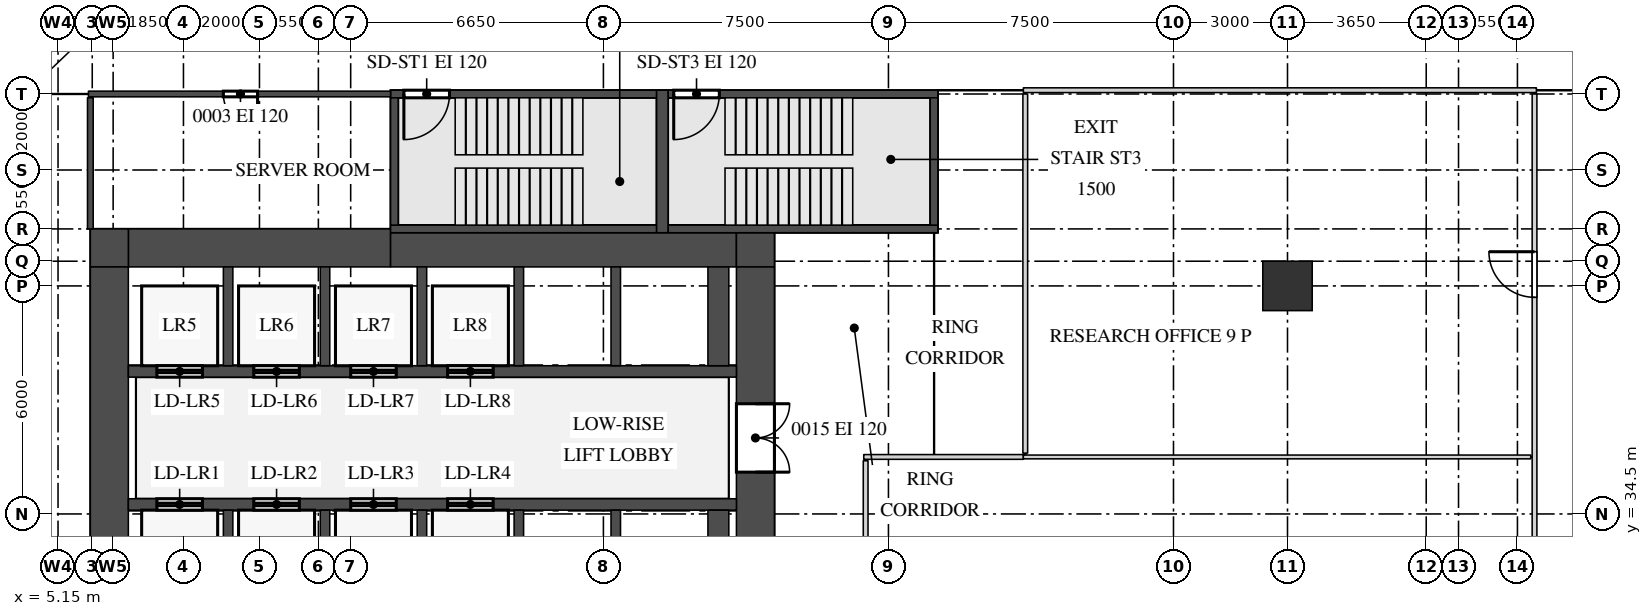
"""IFC4 building model, lengths in metres.
Left out: names, types, materials, properties, quantities, classifications, styles, units other than length and angle.
Written with IfcOpenShell. Run it as: python <this file> out.ifc"""

import sys

from ifc_helpers import new_model, si_unit, direction, frame, frame_2d, origin, origin_2d, place, context, subcontext, project, spatial, rectangle, extrude, source, transform, mapped, element, fill, save


model = new_model("IFC4")
c1 = context("Model", 3, precision=1e-05, world=origin(), true_north=direction((0.0, 1.0)))
c2 = subcontext(c1, "Body", "Model", "MODEL_VIEW")
j1 = project(units=[si_unit("LENGTHUNIT", "METRE"), si_unit("PLANEANGLEUNIT", "RADIAN")], contexts=[c1])
p1 = place(None, origin())
s1 = spatial("IfcSite", under=j1, at=p1, CompositionType="ELEMENT")
p2 = place(p1, origin())
s2 = spatial("IfcBuilding", under=s1, at=p2, CompositionType="ELEMENT")
p3 = place(p2, frame((0.0, 0.0, 127.9)))
s3 = spatial("IfcBuildingStorey", under=s2, at=p3, CompositionType="ELEMENT", Elevation=127.9)
m1 = source(origin(), c2, "Body", "SweptSolid", [
    extrude(rectangle(XDim=6.9, YDim=1.0, at=frame_2d((3.45, 0.0))), origin(), (0.0, 0.0, 1.0), 4.1),
])
p4 = place(p3, frame((7.0, 41.5, 0.0), z_axis=(0.0, 0.0, 1.0), x_axis=(1.0, 0.0, 0.0)))
e1 = element("IfcWall", 1, at=p4, inside=s3, PredefinedType="SHEAR", context=c2, shape_type="MappedRepresentation", body=[
    mapped(m1, transform((0.0, 0.0, 0.0))),
])
m2 = source(origin(), c2, "Body", "SweptSolid", [
    extrude(rectangle(XDim=9.1, YDim=0.9, at=frame_2d((4.55, 0.0))), origin(), (0.0, 0.0, 1.0), 4.1),
])
p5 = place(p3, frame((13.9, 41.45, 0.0), z_axis=(0.0, 0.0, 1.0), x_axis=(1.0, 0.0, 0.0)))
e2 = element("IfcWall", 2, at=p5, inside=s3, PredefinedType="SHEAR", context=c2, shape_type="MappedRepresentation", body=[
    mapped(m2, transform((0.0, 0.0, 0.0))),
])
m3 = source(origin(), c2, "Body", "SweptSolid", [
    extrude(rectangle(XDim=1.0, YDim=0.9, at=frame_2d((0.5, 0.0))), origin(), (0.0, 0.0, 1.0), 4.1),
])
p6 = place(p3, frame((23.0, 41.45, 0.0), z_axis=(0.0, 0.0, 1.0), x_axis=(1.0, 0.0, 0.0)))
e3 = element("IfcWall", 3, at=p6, inside=s3, PredefinedType="SHEAR", context=c2, shape_type="MappedRepresentation", body=[
    mapped(m3, transform((0.0, 0.0, 0.0))),
])
m4 = source(origin(), c2, "Body", "SweptSolid", [
    extrude(rectangle(XDim=1.0, YDim=1.0, at=frame_2d((0.5, 0.0))), origin(), (0.0, 0.0, 1.0), 4.1),
])
p7 = place(p3, frame((6.0, 41.5, 0.0), z_axis=(0.0, 0.0, 1.0), x_axis=(1.0, 0.0, 0.0)))
e4 = element("IfcWall", 4, at=p7, inside=s3, PredefinedType="SHEAR", context=c2, shape_type="MappedRepresentation", body=[
    mapped(m4, transform((0.0, 0.0, 0.0))),
])
m5 = source(origin(), c2, "Body", "SweptSolid", [
    extrude(rectangle(XDim=28.0, YDim=1.0, at=frame_2d((14.0, 0.0))), origin(), (0.0, 0.0, 1.0), 4.1),
])
p8 = place(p3, frame((23.5, 13.0, 0.0), z_axis=(0.0, 0.0, 1.0), x_axis=(0.0, 1.0, 0.0)))
e5 = element("IfcWall", 5, at=p8, inside=s3, PredefinedType="SHEAR", context=c2, shape_type="MappedRepresentation", body=[
    mapped(m5, transform((0.0, 0.0, 0.0))),
])
m6 = source(origin(), c2, "Body", "SweptSolid", [
    extrude(rectangle(XDim=1.8, YDim=2.1, at=frame_2d((0.9, 1.05))), frame((0.0, 0.51, 0.0), z_axis=(0.0, -1.0, 0.0), x_axis=(1.0, 0.0, 0.0)), (0.0, 0.0, 1.0), 1.02),
])
p9 = place(p8, frame((22.6, 0.0, 0.0)))
e6 = element("IfcOpeningElement", 6, at=p9, cuts=e5, PredefinedType="OPENING", context=c2, shape_type="MappedRepresentation", body=[
    mapped(m6, transform((0.0, 0.0, 0.0))),
])
m7 = source(origin(), c2, "Body", "SweptSolid", [
    extrude(rectangle(XDim=1.2, YDim=2.1, at=frame_2d((0.6, 1.05))), frame((0.0, 0.51, 0.0), z_axis=(0.0, -1.0, 0.0), x_axis=(1.0, 0.0, 0.0)), (0.0, 0.0, 1.0), 1.02),
])
p10 = place(p8, frame((15.35, 0.0, 0.0)))
e7 = element("IfcOpeningElement", 7, at=p10, cuts=e5, PredefinedType="OPENING", context=c2, shape_type="MappedRepresentation", body=[
    mapped(m7, transform((0.0, 0.0, 0.0))),
])
m8 = source(origin(), c2, "Body", "SweptSolid", [
    extrude(rectangle(XDim=0.9, YDim=2.1, at=frame_2d((0.45, 1.05))), frame((0.0, 0.51, 0.0), z_axis=(0.0, -1.0, 0.0), x_axis=(1.0, 0.0, 0.0)), (0.0, 0.0, 1.0), 1.02),
])
p11 = place(p8, frame((1.35, 0.0, 0.0)))
e8 = element("IfcOpeningElement", 8, at=p11, cuts=e5, PredefinedType="OPENING", context=c2, shape_type="MappedRepresentation", body=[
    mapped(m8, transform((0.0, 0.0, 0.0))),
])
p12 = place(p8, frame((4.55, 0.0, 0.0)))
e9 = element("IfcOpeningElement", 9, at=p12, cuts=e5, PredefinedType="OPENING", context=c2, shape_type="MappedRepresentation", body=[
    mapped(m8, transform((0.0, 0.0, 0.0))),
])
p13 = place(p8, frame((7.8, 0.0, 0.0)))
e10 = element("IfcOpeningElement", 10, at=p13, cuts=e5, PredefinedType="OPENING", context=c2, shape_type="MappedRepresentation", body=[
    mapped(m8, transform((0.0, 0.0, 0.0))),
])
p14 = place(p3, frame((6.5, 13.0, 0.0), z_axis=(0.0, 0.0, 1.0), x_axis=(0.0, 1.0, 0.0)))
e11 = element("IfcWall", 11, at=p14, inside=s3, PredefinedType="SHEAR", context=c2, shape_type="MappedRepresentation", body=[
    mapped(m5, transform((0.0, 0.0, 0.0))),
])
m9 = source(origin(), c2, "Body", "SweptSolid", [
    extrude(rectangle(XDim=7.0, YDim=0.2, at=frame_2d((3.5, 0.0))), origin(), (0.0, 0.0, 1.0), 4.1),
])
p15 = place(p3, frame((13.9, 45.55, 0.0), z_axis=(0.0, 0.0, 1.0), x_axis=(1.0, 0.0, 0.0)))
e12 = element("IfcWall", 12, at=p15, inside=s3, PredefinedType="SHEAR", context=c2, shape_type="MappedRepresentation", body=[
    mapped(m9, transform((0.0, 0.0, 0.0))),
])
m10 = source(origin(), c2, "Body", "SweptSolid", [
    extrude(rectangle(XDim=1.2, YDim=2.1, at=frame_2d((0.6, 1.05))), frame((0.0, 0.11, 0.0), z_axis=(0.0, -1.0, 0.0), x_axis=(1.0, 0.0, 0.0)), (0.0, 0.0, 1.0), 0.22),
])
p16 = place(p15, frame((0.35, 0.0, 0.0)))
e13 = element("IfcOpeningElement", 13, at=p16, cuts=e12, PredefinedType="OPENING", context=c2, shape_type="MappedRepresentation", body=[
    mapped(m10, transform((0.0, 0.0, 0.0))),
])
p17 = place(p3, frame((13.9, 42.0, 0.0), z_axis=(0.0, 0.0, 1.0), x_axis=(1.0, 0.0, 0.0)))
e14 = element("IfcWall", 14, at=p17, inside=s3, PredefinedType="SHEAR", context=c2, shape_type="MappedRepresentation", body=[
    mapped(m9, transform((0.0, 0.0, 0.0))),
])
m11 = source(origin(), c2, "Body", "SweptSolid", [
    extrude(rectangle(XDim=7.1, YDim=0.2, at=frame_2d((3.55, 0.0))), origin(), (0.0, 0.0, 1.0), 4.1),
])
p18 = place(p3, frame((21.2, 45.55, 0.0), z_axis=(0.0, 0.0, 1.0), x_axis=(1.0, 0.0, 0.0)))
e15 = element("IfcWall", 15, at=p18, inside=s3, PredefinedType="SHEAR", context=c2, shape_type="MappedRepresentation", body=[
    mapped(m11, transform((0.0, 0.0, 0.0))),
])
p19 = place(p18, frame((0.15, 0.0, 0.0)))
e16 = element("IfcOpeningElement", 16, at=p19, cuts=e15, PredefinedType="OPENING", context=c2, shape_type="MappedRepresentation", body=[
    mapped(m10, transform((0.0, 0.0, 0.0))),
])
p20 = place(p3, frame((21.2, 42.0, 0.0), z_axis=(0.0, 0.0, 1.0), x_axis=(1.0, 0.0, 0.0)))
e17 = element("IfcWall", 17, at=p20, inside=s3, PredefinedType="SHEAR", context=c2, shape_type="MappedRepresentation", body=[
    mapped(m11, transform((0.0, 0.0, 0.0))),
])
m12 = source(origin(), c2, "Body", "SweptSolid", [
    extrude(rectangle(XDim=3.75, YDim=0.3, at=frame_2d((1.875, 0.0))), origin(), (0.0, 0.0, 1.0), 4.1),
])
p21 = place(p3, frame((21.05, 41.9, 0.0), z_axis=(0.0, 0.0, 1.0), x_axis=(0.0, 1.0, 0.0)))
e18 = element("IfcWall", 18, at=p21, inside=s3, PredefinedType="SHEAR", context=c2, shape_type="MappedRepresentation", body=[
    mapped(m12, transform((0.0, 0.0, 0.0))),
])
m13 = source(origin(), c2, "Body", "SweptSolid", [
    extrude(rectangle(XDim=3.35, YDim=0.2, at=frame_2d((1.675, 0.0))), origin(), (0.0, 0.0, 1.0), 4.1),
])
for number, where, z_axis, x_axis in (
    (19, (14.0, 42.1, 0.0), (0.0, 0.0, 1.0), (0.0, 1.0, 0.0)),
    (20, (28.2, 42.1, 0.0), (0.0, 0.0, 1.0), (0.0, 1.0, 0.0)),
):
    element("IfcWall", number, at=place(p3, frame(where, z_axis=z_axis, x_axis=x_axis)), inside=s3, PredefinedType="SHEAR", context=c2, shape_type="MappedRepresentation", body=[
        mapped(m13, transform((0.0, 0.0, 0.0))),
    ])
m14 = source(origin(), c2, "Body", "SweptSolid", [
    extrude(rectangle(XDim=16.0, YDim=0.3, at=frame_2d((8.0, 0.0))), origin(), (0.0, 0.0, 1.0), 4.1),
])
p22 = place(p3, frame((7.0, 38.25, 0.0), z_axis=(0.0, 0.0, 1.0), x_axis=(1.0, 0.0, 0.0)))
e21 = element("IfcWall", 21, at=p22, inside=s3, PredefinedType="STANDARD", context=c2, shape_type="MappedRepresentation", body=[
    mapped(m14, transform((0.0, 0.0, 0.0))),
])
m15 = source(origin(), c2, "Body", "SweptSolid", [
    extrude(rectangle(XDim=1.2, YDim=2.1, at=frame_2d((0.6, 1.05))), frame((0.0, 0.16, 0.0), z_axis=(0.0, -1.0, 0.0), x_axis=(1.0, 0.0, 0.0)), (0.0, 0.0, 1.0), 0.32),
])
p23 = place(p22, frame((0.75, 0.0, 0.0)))
e22 = element("IfcOpeningElement", 22, at=p23, cuts=e21, PredefinedType="OPENING", context=c2, shape_type="MappedRepresentation", body=[
    mapped(m15, transform((0.0, 0.0, 0.0))),
])
p24 = place(p22, frame((3.3, 0.0, 0.0)))
e23 = element("IfcOpeningElement", 23, at=p24, cuts=e21, PredefinedType="OPENING", context=c2, shape_type="MappedRepresentation", body=[
    mapped(m15, transform((0.0, 0.0, 0.0))),
])
p25 = place(p22, frame((5.85, 0.0, 0.0)))
e24 = element("IfcOpeningElement", 24, at=p25, cuts=e21, PredefinedType="OPENING", context=c2, shape_type="MappedRepresentation", body=[
    mapped(m15, transform((0.0, 0.0, 0.0))),
])
p26 = place(p22, frame((8.4, 0.0, 0.0)))
e25 = element("IfcOpeningElement", 25, at=p26, cuts=e21, PredefinedType="OPENING", context=c2, shape_type="MappedRepresentation", body=[
    mapped(m15, transform((0.0, 0.0, 0.0))),
])
p27 = place(p3, frame((7.0, 34.75, 0.0), z_axis=(0.0, 0.0, 1.0), x_axis=(1.0, 0.0, 0.0)))
e26 = element("IfcWall", 26, at=p27, inside=s3, PredefinedType="STANDARD", context=c2, shape_type="MappedRepresentation", body=[
    mapped(m14, transform((0.0, 0.0, 0.0))),
])
p28 = place(p27, frame((0.75, 0.0, 0.0)))
e27 = element("IfcOpeningElement", 27, at=p28, cuts=e26, PredefinedType="OPENING", context=c2, shape_type="MappedRepresentation", body=[
    mapped(m15, transform((0.0, 0.0, 0.0))),
])
p29 = place(p27, frame((3.3, 0.0, 0.0)))
e28 = element("IfcOpeningElement", 28, at=p29, cuts=e26, PredefinedType="OPENING", context=c2, shape_type="MappedRepresentation", body=[
    mapped(m15, transform((0.0, 0.0, 0.0))),
])
p30 = place(p27, frame((5.85, 0.0, 0.0)))
e29 = element("IfcOpeningElement", 29, at=p30, cuts=e26, PredefinedType="OPENING", context=c2, shape_type="MappedRepresentation", body=[
    mapped(m15, transform((0.0, 0.0, 0.0))),
])
p31 = place(p27, frame((8.4, 0.0, 0.0)))
e30 = element("IfcOpeningElement", 30, at=p31, cuts=e26, PredefinedType="OPENING", context=c2, shape_type="MappedRepresentation", body=[
    mapped(m15, transform((0.0, 0.0, 0.0))),
])
m16 = source(origin(), c2, "Body", "SweptSolid", [
    extrude(rectangle(XDim=2.6, YDim=0.25, at=frame_2d((1.3, 0.0))), origin(), (0.0, 0.0, 1.0), 4.1),
])
for number, where, z_axis, x_axis in (
    (31, (9.625, 38.4, 0.0), (0.0, 0.0, 1.0), (0.0, 1.0, 0.0)),
    (32, (12.175, 38.4, 0.0), (0.0, 0.0, 1.0), (0.0, 1.0, 0.0)),
    (33, (14.725, 38.4, 0.0), (0.0, 0.0, 1.0), (0.0, 1.0, 0.0)),
    (34, (17.275, 38.4, 0.0), (0.0, 0.0, 1.0), (0.0, 1.0, 0.0)),
    (35, (19.825, 38.4, 0.0), (0.0, 0.0, 1.0), (0.0, 1.0, 0.0)),
):
    element("IfcWall", number, at=place(p3, frame(where, z_axis=z_axis, x_axis=x_axis)), inside=s3, PredefinedType="STANDARD", context=c2, shape_type="MappedRepresentation", body=[
        mapped(m16, transform((0.0, 0.0, 0.0))),
    ])
m17 = source(origin(), c2, "Body", "SweptSolid", [
    extrude(rectangle(XDim=2.6, YDim=0.55, at=frame_2d((1.3, 0.0))), origin(), (0.0, 0.0, 1.0), 4.1),
])
p32 = place(p3, frame((22.525, 38.4, 0.0), z_axis=(0.0, 0.0, 1.0), x_axis=(0.0, 1.0, 0.0)))
e36 = element("IfcWall", 36, at=p32, inside=s3, PredefinedType="STANDARD", context=c2, shape_type="MappedRepresentation", body=[
    mapped(m17, transform((0.0, 0.0, 0.0))),
])
m18 = source(origin(), c2, "Body", "SweptSolid", [
    extrude(rectangle(XDim=2.4, YDim=0.25, at=frame_2d((1.2, 0.0))), origin(), (0.0, 0.0, 1.0), 4.1),
])
for number, where, z_axis, x_axis in (
    (37, (9.625, 32.2, 0.0), (0.0, 0.0, 1.0), (0.0, 1.0, 0.0)),
    (38, (12.175, 32.2, 0.0), (0.0, 0.0, 1.0), (0.0, 1.0, 0.0)),
    (39, (14.725, 32.2, 0.0), (0.0, 0.0, 1.0), (0.0, 1.0, 0.0)),
    (40, (17.275, 32.2, 0.0), (0.0, 0.0, 1.0), (0.0, 1.0, 0.0)),
    (41, (19.825, 32.2, 0.0), (0.0, 0.0, 1.0), (0.0, 1.0, 0.0)),
):
    element("IfcWall", number, at=place(p3, frame(where, z_axis=z_axis, x_axis=x_axis)), inside=s3, PredefinedType="STANDARD", context=c2, shape_type="MappedRepresentation", body=[
        mapped(m18, transform((0.0, 0.0, 0.0))),
    ])
m19 = source(origin(), c2, "Body", "SweptSolid", [
    extrude(rectangle(XDim=2.4, YDim=0.55, at=frame_2d((1.2, 0.0))), origin(), (0.0, 0.0, 1.0), 4.1),
])
p33 = place(p3, frame((22.525, 32.2, 0.0), z_axis=(0.0, 0.0, 1.0), x_axis=(0.0, 1.0, 0.0)))
e42 = element("IfcWall", 42, at=p33, inside=s3, PredefinedType="STANDARD", context=c2, shape_type="MappedRepresentation", body=[
    mapped(m19, transform((0.0, 0.0, 0.0))),
])
m20 = source(origin(), c2, "Body", "SweptSolid", [
    extrude(rectangle(XDim=1.3, YDim=1.3, at=origin_2d()), origin(), (0.0, 0.0, 1.0), 4.1),
])
p34 = place(p3, frame((37.5, 40.5, 0.0), z_axis=(0.0, 0.0, 1.0), x_axis=(1.0, 0.0, 0.0)))
e43 = element("IfcColumn", 43, at=p34, inside=s3, PredefinedType="COLUMN", context=c2, shape_type="MappedRepresentation", body=[
    mapped(m20, transform((0.0, 0.0, 0.0))),
])
m21 = source(origin(), c2, "Body", "SweptSolid", [
    extrude(rectangle(XDim=17.8, YDim=0.125, at=frame_2d((8.9, 0.0))), origin(), (0.0, 0.0, 1.0), 4.2),
])
p35 = place(p3, frame((26.4, 18.1, 0.0), z_axis=(0.0, 0.0, 1.0), x_axis=(0.0, 1.0, 0.0)))
e44 = element("IfcWall", 44, at=p35, inside=s3, PredefinedType="PARTITIONING", context=c2, shape_type="MappedRepresentation", body=[
    mapped(m21, transform((0.0, 0.0, 0.0))),
])
m22 = source(origin(), c2, "Body", "SweptSolid", [
    extrude(rectangle(XDim=27.45, YDim=0.125, at=frame_2d((13.725, 0.0))), origin(), (0.0, 0.0, 1.0), 4.2),
])
p36 = place(p3, frame((44.0, 18.1, 0.0), z_axis=(0.0, 0.0, 1.0), x_axis=(0.0, 1.0, 0.0)))
e45 = element("IfcWall", 45, at=p36, inside=s3, PredefinedType="PARTITIONING", context=c2, shape_type="MappedRepresentation", body=[
    mapped(m22, transform((0.0, 0.0, 0.0))),
])
m23 = source(origin(), c2, "Body", "SweptSolid", [
    extrude(rectangle(XDim=1.2, YDim=2.1, at=frame_2d((0.6, 1.05))), frame((0.0, 0.073, 0.0), z_axis=(0.0, -1.0, 0.0), x_axis=(1.0, 0.0, 0.0)), (0.0, 0.0, 1.0), 0.145),
])
p37 = place(p36, frame((8.3, 0.0, 0.0)))
e46 = element("IfcOpeningElement", 46, at=p37, cuts=e45, PredefinedType="OPENING", context=c2, shape_type="MappedRepresentation", body=[
    mapped(m23, transform((0.0, 0.0, 0.0))),
])
p38 = place(p36, frame((22.1, 0.0, 0.0)))
e47 = element("IfcOpeningElement", 47, at=p38, cuts=e45, PredefinedType="OPENING", context=c2, shape_type="MappedRepresentation", body=[
    mapped(m23, transform((0.0, 0.0, 0.0))),
])
m24 = source(origin(), c2, "Body", "SweptSolid", [
    extrude(rectangle(XDim=4.2, YDim=0.125, at=frame_2d((2.1, 0.0))), origin(), (0.0, 0.0, 1.0), 4.2),
])
p39 = place(p3, frame((26.35, 36.0, 0.0), z_axis=(0.0, 0.0, 1.0), x_axis=(1.0, 0.0, 0.0)))
e48 = element("IfcWall", 48, at=p39, inside=s3, PredefinedType="PARTITIONING", context=c2, shape_type="MappedRepresentation", body=[
    mapped(m24, transform((0.0, 0.0, 0.0))),
])
m25 = source(origin(), c2, "Body", "SweptSolid", [
    extrude(rectangle(XDim=13.35, YDim=0.1, at=frame_2d((6.675, 0.0))), origin(), (0.0, 0.0, 1.0), 4.2),
])
p40 = place(p3, frame((30.55, 36.0, 0.0), z_axis=(0.0, 0.0, 1.0), x_axis=(1.0, 0.0, 0.0)))
e49 = element("IfcWall", 49, at=p40, inside=s3, PredefinedType="PARTITIONING", context=c2, shape_type="MappedRepresentation", body=[
    mapped(m25, transform((0.0, 0.0, 0.0))),
])
m26 = source(origin(), c2, "Body", "SweptSolid", [
    extrude(rectangle(XDim=9.45, YDim=0.125, at=frame_2d((4.725, 0.0))), origin(), (0.0, 0.0, 1.0), 4.2),
])
p41 = place(p3, frame((30.6, 36.1, 0.0), z_axis=(0.0, 0.0, 1.0), x_axis=(0.0, 1.0, 0.0)))
e50 = element("IfcWall", 50, at=p41, inside=s3, PredefinedType="PARTITIONING", context=c2, shape_type="MappedRepresentation", body=[
    mapped(m26, transform((0.0, 0.0, 0.0))),
])
m27 = source(origin(), c2, "Body", "SweptSolid", [
    extrude(rectangle(XDim=3.45, YDim=0.15, at=frame_2d((1.725, 0.0))), origin(), (0.0, 0.0, 1.0), 4.2),
])
p42 = place(p3, frame((6.0, 42.0, 0.0), z_axis=(0.0, 0.0, 1.0), x_axis=(0.0, 1.0, 0.0)))
e51 = element("IfcWall", 51, at=p42, inside=s3, PredefinedType="PARTITIONING", context=c2, shape_type="MappedRepresentation", body=[
    mapped(m27, transform((0.0, 0.0, 0.0))),
])
m28 = source(origin(), c2, "Body", "SweptSolid", [
    extrude(rectangle(XDim=7.95, YDim=0.15, at=frame_2d((3.975, 0.0))), origin(), (0.0, 0.0, 1.0), 4.2),
])
p43 = place(p3, frame((5.95, 45.55, 0.0), z_axis=(0.0, 0.0, 1.0), x_axis=(1.0, 0.0, 0.0)))
e52 = element("IfcWall", 52, at=p43, inside=s3, PredefinedType="PARTITIONING", context=c2, shape_type="MappedRepresentation", body=[
    mapped(m28, transform((0.0, 0.0, 0.0))),
])
m29 = source(origin(), c2, "Body", "SweptSolid", [
    extrude(rectangle(XDim=0.9, YDim=2.1, at=frame_2d((0.45, 1.05))), frame((0.0, 0.085, 0.0), z_axis=(0.0, -1.0, 0.0), x_axis=(1.0, 0.0, 0.0)), (0.0, 0.0, 1.0), 0.17),
])
p44 = place(p43, frame((3.55, 0.0, 0.0)))
e53 = element("IfcOpeningElement", 53, at=p44, cuts=e52, PredefinedType="OPENING", context=c2, shape_type="MappedRepresentation", body=[
    mapped(m29, transform((0.0, 0.0, 0.0))),
])
m30 = source(origin(), c2, "Body", "SweptSolid", [
    extrude(rectangle(XDim=13.5, YDim=0.125, at=frame_2d((6.75, 0.0))), origin(), (0.0, 0.0, 1.0), 4.2),
])
p45 = place(p3, frame((30.55, 45.65, 0.0), z_axis=(0.0, 0.0, 1.0), x_axis=(1.0, 0.0, 0.0)))
e54 = element("IfcWall", 54, at=p45, inside=s3, PredefinedType="PARTITIONING", context=c2, shape_type="MappedRepresentation", body=[
    mapped(m30, transform((0.0, 0.0, 0.0))),
])
m31 = source(origin(), c2, "Body", "SweptSolid", [
    extrude(rectangle(XDim=1.8, YDim=2.1, at=frame_2d((0.9, 1.05))), frame((0.0, 0.45, 0.0), z_axis=(0.0, -1.0, 0.0), x_axis=(1.0, 0.0, 0.0)), (0.0, 0.0, 1.0), 0.9),
])
p46 = place(p9, origin())
e55 = element("IfcDoor", 55, at=p46, inside=s3, OperationType="DOUBLE_DOOR_SINGLE_SWING", PredefinedType="DOOR", context=c2, shape_type="MappedRepresentation", body=[
    mapped(m31, transform((0.0, 0.0, 0.0))),
])
fill(e6, e55)
m32 = source(origin(), c2, "Body", "SweptSolid", [
    extrude(rectangle(XDim=1.2, YDim=2.1, at=frame_2d((0.6, 1.05))), frame((0.0, 0.025, 0.0), z_axis=(0.0, -1.0, 0.0), x_axis=(1.0, 0.0, 0.0)), (0.0, 0.0, 1.0), 0.05),
])
p47 = place(p38, origin())
e56 = element("IfcDoor", 56, at=p47, inside=s3, OperationType="SINGLE_SWING_LEFT", PredefinedType="DOOR", context=c2, shape_type="MappedRepresentation", body=[
    mapped(m32, transform((0.0, 0.0, 0.0))),
])
fill(e47, e56)
m33 = source(origin(), c2, "Body", "SweptSolid", [
    extrude(rectangle(XDim=0.9, YDim=2.1, at=frame_2d((0.45, 1.05))), frame((0.0, 0.025, 0.0), z_axis=(0.0, -1.0, 0.0), x_axis=(1.0, 0.0, 0.0)), (0.0, 0.0, 1.0), 0.05),
])
p48 = place(p44, origin())
e57 = element("IfcDoor", 57, at=p48, inside=s3, OperationType="SINGLE_SWING_RIGHT", PredefinedType="DOOR", context=c2, shape_type="MappedRepresentation", body=[
    mapped(m33, transform((0.0, 0.0, 0.0))),
])
fill(e53, e57)
p49 = place(p16, origin())
e58 = element("IfcDoor", 58, at=p49, inside=s3, OperationType="SINGLE_SWING_LEFT", PredefinedType="DOOR", context=c2, shape_type="MappedRepresentation", body=[
    mapped(m32, transform((0.0, 0.0, 0.0))),
])
fill(e13, e58)
p50 = place(p19, origin())
e59 = element("IfcDoor", 59, at=p50, inside=s3, OperationType="SINGLE_SWING_LEFT", PredefinedType="DOOR", context=c2, shape_type="MappedRepresentation", body=[
    mapped(m32, transform((0.0, 0.0, 0.0))),
])
fill(e16, e59)
p51 = place(p28, origin())
e60 = element("IfcDoor", 60, at=p51, inside=s3, OperationType="DOUBLE_DOOR_SLIDING", PredefinedType="DOOR", context=c2, shape_type="MappedRepresentation", body=[
    mapped(m32, transform((0.0, 0.0, 0.0))),
])
fill(e27, e60)
p52 = place(p29, origin())
e61 = element("IfcDoor", 61, at=p52, inside=s3, OperationType="DOUBLE_DOOR_SLIDING", PredefinedType="DOOR", context=c2, shape_type="MappedRepresentation", body=[
    mapped(m32, transform((0.0, 0.0, 0.0))),
])
fill(e28, e61)
p53 = place(p30, origin())
e62 = element("IfcDoor", 62, at=p53, inside=s3, OperationType="DOUBLE_DOOR_SLIDING", PredefinedType="DOOR", context=c2, shape_type="MappedRepresentation", body=[
    mapped(m32, transform((0.0, 0.0, 0.0))),
])
fill(e29, e62)
p54 = place(p31, origin())
e63 = element("IfcDoor", 63, at=p54, inside=s3, OperationType="DOUBLE_DOOR_SLIDING", PredefinedType="DOOR", context=c2, shape_type="MappedRepresentation", body=[
    mapped(m32, transform((0.0, 0.0, 0.0))),
])
fill(e30, e63)
p55 = place(p23, origin())
e64 = element("IfcDoor", 64, at=p55, inside=s3, OperationType="DOUBLE_DOOR_SLIDING", PredefinedType="DOOR", context=c2, shape_type="MappedRepresentation", body=[
    mapped(m32, transform((0.0, 0.0, 0.0))),
])
fill(e22, e64)
p56 = place(p24, origin())
e65 = element("IfcDoor", 65, at=p56, inside=s3, OperationType="DOUBLE_DOOR_SLIDING", PredefinedType="DOOR", context=c2, shape_type="MappedRepresentation", body=[
    mapped(m32, transform((0.0, 0.0, 0.0))),
])
fill(e23, e65)
p57 = place(p25, origin())
e66 = element("IfcDoor", 66, at=p57, inside=s3, OperationType="DOUBLE_DOOR_SLIDING", PredefinedType="DOOR", context=c2, shape_type="MappedRepresentation", body=[
    mapped(m32, transform((0.0, 0.0, 0.0))),
])
fill(e24, e66)
p58 = place(p26, origin())
e67 = element("IfcDoor", 67, at=p58, inside=s3, OperationType="DOUBLE_DOOR_SLIDING", PredefinedType="DOOR", context=c2, shape_type="MappedRepresentation", body=[
    mapped(m32, transform((0.0, 0.0, 0.0))),
])
fill(e25, e67)
save(model, sys.argv[1])
